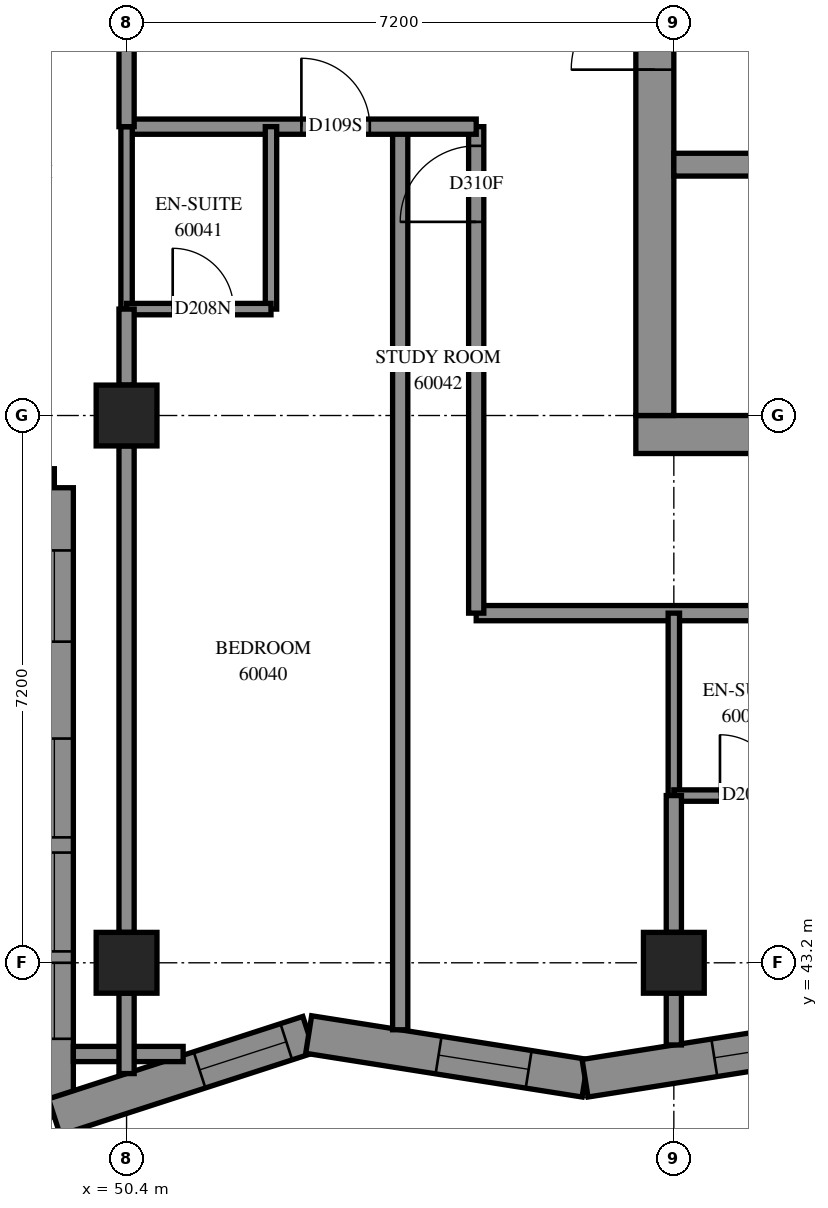
"""IFC4 building model, lengths in metres.
Left out: names, types, materials, properties, quantities, classifications, styles, units other than length and angle.
Written with IfcOpenShell. Run it as: python <this file> out.ifc"""

import sys

from ifc_helpers import new_model, si_unit, direction, frame, frame_2d, origin, origin_2d, place, context, subcontext, project, spatial, polyline, rectangle, outline, extrude, element, fill, save


model = new_model("IFC4")
c1 = context("Model", 3, precision=1e-05, world=origin(), true_north=direction((0.0, 1.0)))
c2 = subcontext(c1, "Body", "Model", "MODEL_VIEW")
j1 = project(units=[si_unit("LENGTHUNIT", "METRE"), si_unit("PLANEANGLEUNIT", "RADIAN")], contexts=[c1])
p1 = place(None, origin())
s1 = spatial("IfcSite", under=j1, at=p1, CompositionType="ELEMENT")
p2 = place(p1, origin())
s2 = spatial("IfcBuilding", under=s1, at=p2, CompositionType="ELEMENT")
p3 = place(p2, frame((0.0, 0.0, 220.2)))
s3 = spatial("IfcBuildingStorey", under=s2, at=p3, CompositionType="ELEMENT", Elevation=220.2)
for number, where, z_axis, x_axis in (
    (1, (50.4, 43.2, 0.0), (0.0, 0.0, 1.0), (1.0, 0.0, 0.0)),
    (2, (50.4, 50.4, 0.0), (0.0, 0.0, 1.0), (1.0, 0.0, 0.0)),
    (3, (57.6, 43.2, 0.0), (0.0, 0.0, 1.0), (1.0, 0.0, 0.0)),
):
    element("IfcColumn", number, at=place(p3, frame(where, z_axis=z_axis, x_axis=x_axis)), inside=s3, PredefinedType="COLUMN", context=c2, shape_type="SweptSolid", body=[
        extrude(rectangle(XDim=0.8, YDim=0.8, at=origin_2d()), origin(), (0.0, 0.0, 1.0), 3.1),
    ])
p4 = place(p3, frame((57.1, 50.15, -0.3), z_axis=(0.0, 0.0, 1.0), x_axis=(1.0, 0.0, 0.0)))
e4 = element("IfcWall", 4, at=p4, inside=s3, PredefinedType="SHEAR", context=c2, shape_type="SweptSolid", body=[
    extrude(rectangle(XDim=15.4, YDim=0.5, at=frame_2d((7.7, 0.0))), origin(), (0.0, 0.0, 1.0), 2.7),
])
p5 = place(p3, frame((57.35, 50.4, -0.3), z_axis=(0.0, 0.0, 1.0), x_axis=(0.0, 1.0, 0.0)))
e5 = element("IfcWall", 5, at=p5, inside=s3, PredefinedType="SHEAR", context=c2, shape_type="SweptSolid", body=[
    extrude(rectangle(XDim=14.4, YDim=0.5, at=frame_2d((7.2, 0.0))), origin(), (0.0, 0.0, 1.0), 2.7),
])
p6 = place(p5, frame((4.55, 0.0, 0.3)))
e6 = element("IfcOpeningElement", 6, at=p6, cuts=e5, PredefinedType="OPENING", context=c2, shape_type="SweptSolid", body=[
    extrude(rectangle(XDim=1.1, YDim=2.1, at=frame_2d((0.55, 1.05))), frame((0.0, 0.26, 0.0), z_axis=(0.0, -1.0, 0.0), x_axis=(1.0, 0.0, 0.0)), (0.0, 0.0, 1.0), 0.52),
])
p7 = place(p5, frame((11.35, 0.0, 0.3)))
e7 = element("IfcOpeningElement", 7, at=p7, cuts=e5, PredefinedType="OPENING", context=c2, shape_type="SweptSolid", body=[
    extrude(rectangle(XDim=1.1, YDim=2.1, at=frame_2d((0.55, 1.05))), frame((0.0, 0.26, 0.0), z_axis=(0.0, -1.0, 0.0), x_axis=(1.0, 0.0, 0.0)), (0.0, 0.0, 1.0), 0.52),
])
p8 = place(p3, frame((57.6, 53.7, 0.0), z_axis=(0.0, 0.0, 1.0), x_axis=(1.0, 0.0, 0.0)))
e8 = element("IfcWall", 8, at=p8, inside=s3, PredefinedType="SOLIDWALL", context=c2, shape_type="SweptSolid", body=[
    extrude(rectangle(XDim=14.4, YDim=0.3, at=frame_2d((7.2, 0.0))), origin(), (0.0, 0.0, 1.0), 3.1),
])
p9 = place(p8, frame((1.35, 0.0, 0.0)))
e9 = element("IfcOpeningElement", 9, at=p9, cuts=e8, PredefinedType="OPENING", context=c2, shape_type="SweptSolid", body=[
    extrude(rectangle(XDim=0.9, YDim=2.1, at=frame_2d((0.45, 1.05))), frame((0.0, 0.16, 0.0), z_axis=(0.0, -1.0, 0.0), x_axis=(1.0, 0.0, 0.0)), (0.0, 0.0, 1.0), 0.32),
])
p10 = place(p8, frame((4.95, 0.0, 0.0)))
e10 = element("IfcOpeningElement", 10, at=p10, cuts=e8, PredefinedType="OPENING", context=c2, shape_type="SweptSolid", body=[
    extrude(rectangle(XDim=0.9, YDim=2.1, at=frame_2d((0.45, 1.05))), frame((0.0, 0.16, 0.0), z_axis=(0.0, -1.0, 0.0), x_axis=(1.0, 0.0, 0.0)), (0.0, 0.0, 1.0), 0.32),
])
p11 = place(p8, frame((8.55, 0.0, 0.0)))
e11 = element("IfcOpeningElement", 11, at=p11, cuts=e8, PredefinedType="OPENING", context=c2, shape_type="SweptSolid", body=[
    extrude(rectangle(XDim=0.9, YDim=2.1, at=frame_2d((0.45, 1.05))), frame((0.0, 0.16, 0.0), z_axis=(0.0, -1.0, 0.0), x_axis=(1.0, 0.0, 0.0)), (0.0, 0.0, 1.0), 0.32),
])
p12 = place(p8, frame((12.05, 0.0, 0.0)))
e12 = element("IfcOpeningElement", 12, at=p12, cuts=e8, PredefinedType="OPENING", context=c2, shape_type="SweptSolid", body=[
    extrude(rectangle(XDim=1.1, YDim=2.1, at=frame_2d((0.55, 1.05))), frame((0.0, 0.16, 0.0), z_axis=(0.0, -1.0, 0.0), x_axis=(1.0, 0.0, 0.0)), (0.0, 0.0, 1.0), 0.32),
])
p13 = place(p3, frame((42.25, 49.45, 0.0), z_axis=(0.0, 0.0, 1.0), x_axis=(1.0, 0.0, 0.0)))
e13 = element("IfcWall", 13, at=p13, inside=s3, PredefinedType="SOLIDWALL", context=c2, shape_type="SweptSolid", body=[
    extrude(outline(polyline([(-0.25, -0.25), (6.95, -0.25), (7.45, 0.25), (0.25, 0.25), (-0.25, -0.25)])), origin(), (0.0, 0.0, 1.0), 3.1),
])
p14 = place(p13, frame((1.35, 0.0, 0.45)))
e14 = element("IfcOpeningElement", 14, at=p14, cuts=e13, PredefinedType="OPENING", context=c2, shape_type="SweptSolid", body=[
    extrude(rectangle(XDim=1.3, YDim=2.5, at=frame_2d((0.65, 1.25))), frame((0.0, 0.26, 0.0), z_axis=(0.0, -1.0, 0.0), x_axis=(1.0, 0.0, 0.0)), (0.0, 0.0, 1.0), 0.52),
])
p15 = place(p13, frame((2.85, 0.0, 0.45)))
e15 = element("IfcOpeningElement", 15, at=p15, cuts=e13, PredefinedType="OPENING", context=c2, shape_type="SweptSolid", body=[
    extrude(rectangle(XDim=1.3, YDim=2.5, at=frame_2d((0.65, 1.25))), frame((0.0, 0.26, 0.0), z_axis=(0.0, -1.0, 0.0), x_axis=(1.0, 0.0, 0.0)), (0.0, 0.0, 1.0), 0.52),
])
p16 = place(p13, frame((5.175, 0.0, 0.45)))
e16 = element("IfcOpeningElement", 16, at=p16, cuts=e13, PredefinedType="OPENING", context=c2, shape_type="SweptSolid", body=[
    extrude(rectangle(XDim=1.2, YDim=2.5, at=frame_2d((0.6, 1.25))), frame((0.0, 0.26, 0.0), z_axis=(0.0, -1.0, 0.0), x_axis=(1.0, 0.0, 0.0)), (0.0, 0.0, 1.0), 0.52),
])
p17 = place(p3, frame((49.45, 49.45, 0.0), z_axis=(0.0, 0.0, 1.0), x_axis=(0.0, -1.0, 0.0)))
e17 = element("IfcWall", 17, at=p17, inside=s3, PredefinedType="SOLIDWALL", context=c2, shape_type="SweptSolid", body=[
    extrude(outline(polyline([(0.25, -0.25), (8.622, -0.25), (7.934, 0.25), (-0.25, 0.25), (0.25, -0.25)])), origin(), (0.0, 0.0, 1.0), 3.1),
])
p18 = place(p17, frame((3.3, 0.0, 0.45)))
e18 = element("IfcOpeningElement", 18, at=p18, cuts=e17, PredefinedType="OPENING", context=c2, shape_type="SweptSolid", body=[
    extrude(rectangle(XDim=1.3, YDim=2.5, at=frame_2d((0.65, 1.25))), frame((0.0, 0.26, 0.0), z_axis=(0.0, -1.0, 0.0), x_axis=(1.0, 0.0, 0.0)), (0.0, 0.0, 1.0), 0.52),
])
p19 = place(p17, frame((4.8, 0.0, 0.45)))
e19 = element("IfcOpeningElement", 19, at=p19, cuts=e17, PredefinedType="OPENING", context=c2, shape_type="SweptSolid", body=[
    extrude(rectangle(XDim=1.3, YDim=2.5, at=frame_2d((0.65, 1.25))), frame((0.0, 0.26, 0.0), z_axis=(0.0, -1.0, 0.0), x_axis=(1.0, 0.0, 0.0)), (0.0, 0.0, 1.0), 0.52),
])
p20 = place(p17, frame((0.825, 0.0, 0.45)))
e20 = element("IfcOpeningElement", 20, at=p20, cuts=e17, PredefinedType="OPENING", context=c2, shape_type="SweptSolid", body=[
    extrude(rectangle(XDim=1.2, YDim=2.5, at=frame_2d((0.6, 1.25))), frame((0.0, 0.26, 0.0), z_axis=(0.0, -1.0, 0.0), x_axis=(1.0, 0.0, 0.0)), (0.0, 0.0, 1.0), 0.52),
])
p21 = place(p17, frame((6.25, 0.0, 0.45)))
e21 = element("IfcOpeningElement", 21, at=p21, cuts=e17, PredefinedType="OPENING", context=c2, shape_type="SweptSolid", body=[
    extrude(rectangle(XDim=1.0, YDim=2.5, at=frame_2d((0.5, 1.25))), frame((0.0, 0.26, 0.0), z_axis=(0.0, -1.0, 0.0), x_axis=(1.0, 0.0, 0.0)), (0.0, 0.0, 1.0), 0.52),
])
p22 = place(p3, frame((49.45, 41.172, 0.0), z_axis=(0.0, 0.0, 1.0), x_axis=(0.9512775992, 0.3083357412, 0.0)))
e22 = element("IfcWall", 22, at=p22, inside=s3, PredefinedType="SOLIDWALL", context=c2, shape_type="SweptSolid", body=[
    extrude(outline(polyline([(-0.344, -0.25), (3.457, -0.25), (3.577, 0.25), (0.344, 0.25), (-0.344, -0.25)])), origin(), (0.0, 0.0, 1.0), 3.1),
])
p23 = place(p22, frame((2.008, 0.0, 0.45)))
e23 = element("IfcOpeningElement", 23, at=p23, cuts=e22, PredefinedType="OPENING", context=c2, shape_type="SweptSolid", body=[
    extrude(rectangle(XDim=1.2, YDim=2.5, at=frame_2d((0.6, 1.25))), frame((0.0, 0.26, 0.0), z_axis=(0.0, -1.0, 0.0), x_axis=(1.0, 0.0, 0.0)), (0.0, 0.0, 1.0), 0.52),
])
p24 = place(p3, frame((52.796, 42.256, 0.0), z_axis=(0.0, 0.0, 1.0), x_axis=(0.9877177726, -0.1562485253, 0.0)))
e24 = element("IfcWall", 24, at=p24, inside=s3, PredefinedType="SOLIDWALL", context=c2, shape_type="SweptSolid", body=[
    extrude(outline(polyline([(0.06, -0.25), (3.721, -0.25), (3.642, 0.25), (-0.06, 0.25), (0.06, -0.25)])), origin(), (0.0, 0.0, 1.0), 3.1),
])
p25 = place(p24, frame((1.73, 0.0, 0.45)))
e25 = element("IfcOpeningElement", 25, at=p25, cuts=e24, PredefinedType="OPENING", context=c2, shape_type="SweptSolid", body=[
    extrude(rectangle(XDim=1.2, YDim=2.5, at=frame_2d((0.6, 1.25))), frame((0.0, 0.26, 0.0), z_axis=(0.0, -1.0, 0.0), x_axis=(1.0, 0.0, 0.0)), (0.0, 0.0, 1.0), 0.52),
])
p26 = place(p3, frame((56.432, 41.681, 0.0), z_axis=(0.0, 0.0, 1.0), x_axis=(0.9877186305, 0.156243102, 0.0)))
e26 = element("IfcWall", 26, at=p26, inside=s3, PredefinedType="SOLIDWALL", context=c2, shape_type="SweptSolid", body=[
    extrude(outline(polyline([(-0.04, -0.25), (3.621, -0.25), (3.7, 0.25), (0.04, 0.25), (-0.04, -0.25)])), origin(), (0.0, 0.0, 1.0), 3.1),
])
p27 = place(p26, frame((1.722, 0.0, 0.45)))
e27 = element("IfcOpeningElement", 27, at=p27, cuts=e26, PredefinedType="OPENING", context=c2, shape_type="SweptSolid", body=[
    extrude(rectangle(XDim=1.2, YDim=2.5, at=frame_2d((0.6, 1.25))), frame((0.0, 0.26, 0.0), z_axis=(0.0, -1.0, 0.0), x_axis=(1.0, 0.0, 0.0)), (0.0, 0.0, 1.0), 0.52),
])
p28 = place(p3, frame((55.0, 47.8, 0.0), z_axis=(0.0, 0.0, 1.0), x_axis=(1.0, 0.0, 0.0)))
e28 = element("IfcWall", 28, at=p28, inside=s3, PredefinedType="PARTITIONING", context=c2, shape_type="SweptSolid", body=[
    extrude(rectangle(XDim=19.266, YDim=0.2, at=frame_2d((9.633, 0.0))), origin(), (0.0, 0.0, 1.0), 3.1),
])
p29 = place(p28, frame((4.9, 0.0, 0.0)))
e29 = element("IfcOpeningElement", 29, at=p29, cuts=e28, PredefinedType="OPENING", context=c2, shape_type="SweptSolid", body=[
    extrude(rectangle(XDim=0.9, YDim=2.1, at=frame_2d((0.45, 1.05))), frame((0.0, 0.11, 0.0), z_axis=(0.0, -1.0, 0.0), x_axis=(1.0, 0.0, 0.0)), (0.0, 0.0, 1.0), 0.22),
])
p30 = place(p28, frame((6.6, 0.0, 0.0)))
e30 = element("IfcOpeningElement", 30, at=p30, cuts=e28, PredefinedType="OPENING", context=c2, shape_type="SweptSolid", body=[
    extrude(rectangle(XDim=0.9, YDim=2.1, at=frame_2d((0.45, 1.05))), frame((0.0, 0.11, 0.0), z_axis=(0.0, -1.0, 0.0), x_axis=(1.0, 0.0, 0.0)), (0.0, 0.0, 1.0), 0.22),
])
p31 = place(p28, frame((13.661, 0.0, 0.0)))
e31 = element("IfcOpeningElement", 31, at=p31, cuts=e28, PredefinedType="OPENING", context=c2, shape_type="SweptSolid", body=[
    extrude(rectangle(XDim=0.9, YDim=2.1, at=frame_2d((0.45, 1.05))), frame((0.0, 0.11, 0.0), z_axis=(0.0, -1.0, 0.0), x_axis=(1.0, 0.0, 0.0)), (0.0, 0.0, 1.0), 0.22),
])
p32 = place(p3, frame((54.0, 42.319, 0.0), z_axis=(0.0, 0.0, 1.0), x_axis=(0.0, 1.0, 0.0)))
e32 = element("IfcWall", 32, at=p32, inside=s3, PredefinedType="PARTITIONING", context=c2, shape_type="SweptSolid", body=[
    extrude(rectangle(XDim=11.881, YDim=0.2, at=frame_2d((5.941, 0.0))), origin(), (0.0, 0.0, 1.0), 3.1),
])
p33 = place(p3, frame((55.0, 47.8, 0.0), z_axis=(0.0, 0.0, 1.0), x_axis=(0.0, 1.0, 0.0)))
e33 = element("IfcWall", 33, at=p33, inside=s3, PredefinedType="PARTITIONING", context=c2, shape_type="SweptSolid", body=[
    extrude(rectangle(XDim=6.4, YDim=0.2, at=frame_2d((3.2, 0.0))), origin(), (0.0, 0.0, 1.0), 3.1),
])
p34 = place(p33, frame((5.147, 0.0, 0.0)))
e34 = element("IfcOpeningElement", 34, at=p34, cuts=e33, PredefinedType="OPENING", context=c2, shape_type="SweptSolid", body=[
    extrude(rectangle(XDim=1.0, YDim=2.1, at=frame_2d((0.5, 1.05))), frame((0.0, 0.11, 0.0), z_axis=(0.0, -1.0, 0.0), x_axis=(1.0, 0.0, 0.0)), (0.0, 0.0, 1.0), 0.22),
])
p35 = place(p3, frame((50.4, 43.6, 0.0), z_axis=(0.0, 0.0, 1.0), x_axis=(0.0, 1.0, 0.0)))
e35 = element("IfcWall", 35, at=p35, inside=s3, PredefinedType="PARTITIONING", context=c2, shape_type="SweptSolid", body=[
    extrude(rectangle(XDim=6.4, YDim=0.2, at=frame_2d((3.2, 0.0))), origin(), (0.0, 0.0, 1.0), 2.6),
])
p36 = place(p3, frame((50.4, 54.2, 0.0), z_axis=(0.0, 0.0, 1.0), x_axis=(1.0, 0.0, 0.0)))
e36 = element("IfcWall", 36, at=p36, inside=s3, PredefinedType="PARTITIONING", context=c2, shape_type="SweptSolid", body=[
    extrude(rectangle(XDim=4.6, YDim=0.2, at=frame_2d((2.3, 0.0))), origin(), (0.0, 0.0, 1.0), 3.1),
])
p37 = place(p36, frame((2.3, 0.0, 0.0)))
e37 = element("IfcOpeningElement", 37, at=p37, cuts=e36, PredefinedType="OPENING", context=c2, shape_type="SweptSolid", body=[
    extrude(rectangle(XDim=0.9, YDim=2.1, at=frame_2d((0.45, 1.05))), frame((0.0, 0.11, 0.0), z_axis=(0.0, -1.0, 0.0), x_axis=(1.0, 0.0, 0.0)), (0.0, 0.0, 1.0), 0.22),
])
for number, where, z_axis, x_axis in (
    (38, (52.3, 51.8, 0.0), (0.0, 0.0, 1.0), (0.0, 1.0, 0.0)),
    (39, (50.4, 51.8, 0.0), (0.0, 0.0, 1.0), (0.0, 1.0, 0.0)),
    (40, (57.6, 45.4, 0.0), (0.0, 0.0, 1.0), (0.0, 1.0, 0.0)),
):
    element("IfcWall", number, at=place(p3, frame(where, z_axis=z_axis, x_axis=x_axis)), inside=s3, PredefinedType="PARTITIONING", context=c2, shape_type="SweptSolid", body=[
        extrude(rectangle(XDim=2.4, YDim=0.15, at=frame_2d((1.2, 0.0))), origin(), (0.0, 0.0, 1.0), 3.1),
    ])
p38 = place(p3, frame((50.4, 54.2, 0.0), z_axis=(0.0, 0.0, 1.0), x_axis=(0.0, 1.0, 0.0)))
e41 = element("IfcWall", 41, at=p38, inside=s3, PredefinedType="PARTITIONING", context=c2, shape_type="SweptSolid", body=[
    extrude(rectangle(XDim=2.0, YDim=0.2, at=frame_2d((1.0, 0.0))), origin(), (0.0, 0.0, 1.0), 3.1),
])
p39 = place(p3, frame((50.4, 51.8, 0.0), z_axis=(0.0, 0.0, 1.0), x_axis=(1.0, 0.0, 0.0)))
e42 = element("IfcWall", 42, at=p39, inside=s3, PredefinedType="PARTITIONING", context=c2, shape_type="SweptSolid", body=[
    extrude(rectangle(XDim=1.9, YDim=0.15, at=frame_2d((0.95, 0.0))), origin(), (0.0, 0.0, 1.0), 3.1),
])
p40 = place(p39, frame((0.607, 0.0, 0.0)))
e43 = element("IfcOpeningElement", 43, at=p40, cuts=e42, PredefinedType="OPENING", context=c2, shape_type="SweptSolid", body=[
    extrude(rectangle(XDim=0.8, YDim=2.1, at=frame_2d((0.4, 1.05))), frame((0.0, 0.085, 0.0), z_axis=(0.0, -1.0, 0.0), x_axis=(1.0, 0.0, 0.0)), (0.0, 0.0, 1.0), 0.17),
])
p41 = place(p3, frame((57.6, 45.4, 0.0), z_axis=(0.0, 0.0, 1.0), x_axis=(1.0, 0.0, 0.0)))
e44 = element("IfcWall", 44, at=p41, inside=s3, PredefinedType="PARTITIONING", context=c2, shape_type="SweptSolid", body=[
    extrude(rectangle(XDim=1.9, YDim=0.15, at=frame_2d((0.95, 0.0))), origin(), (0.0, 0.0, 1.0), 3.1),
])
p42 = place(p41, frame((0.607, 0.0, 0.0)))
e45 = element("IfcOpeningElement", 45, at=p42, cuts=e44, PredefinedType="OPENING", context=c2, shape_type="SweptSolid", body=[
    extrude(rectangle(XDim=0.8, YDim=2.1, at=frame_2d((0.4, 1.05))), frame((0.0, 0.085, 0.0), z_axis=(0.0, -1.0, 0.0), x_axis=(1.0, 0.0, 0.0)), (0.0, 0.0, 1.0), 0.17),
])
p43 = place(p3, frame((57.6, 43.6, 0.0), z_axis=(0.0, 0.0, 1.0), x_axis=(0.0, 1.0, 0.0)))
e46 = element("IfcWall", 46, at=p43, inside=s3, PredefinedType="PARTITIONING", context=c2, shape_type="SweptSolid", body=[
    extrude(rectangle(XDim=1.8, YDim=0.2, at=frame_2d((0.9, 0.0))), origin(), (0.0, 0.0, 1.0), 3.1),
])
p44 = place(p3, frame((49.7, 42.0, 0.0), z_axis=(0.0, 0.0, 1.0), x_axis=(1.0, 0.0, 0.0)))
e47 = element("IfcWall", 47, at=p44, inside=s3, PredefinedType="PARTITIONING", context=c2, shape_type="SweptSolid", body=[
    extrude(rectangle(XDim=1.444, YDim=0.2, at=frame_2d((0.722, 0.0))), origin(), (0.0, 0.0, 1.0), 3.1),
])
p45 = place(p3, frame((50.4, 50.8, 0.0), z_axis=(0.0, 0.0, 1.0), x_axis=(0.0, 1.0, 0.0)))
e48 = element("IfcWall", 48, at=p45, inside=s3, PredefinedType="PARTITIONING", context=c2, shape_type="SweptSolid", body=[
    extrude(rectangle(XDim=1.0, YDim=0.2, at=frame_2d((0.5, 0.0))), origin(), (0.0, 0.0, 1.0), 3.1),
])
p46 = place(p3, frame((50.4, 41.742, 0.0), z_axis=(0.0, 0.0, 1.0), x_axis=(0.0, 1.0, 0.0)))
e49 = element("IfcWall", 49, at=p46, inside=s3, PredefinedType="PARTITIONING", context=c2, shape_type="SweptSolid", body=[
    extrude(rectangle(XDim=1.058, YDim=0.2, at=frame_2d((0.529, 0.0))), origin(), (0.0, 0.0, 1.0), 3.1),
])
p47 = place(p3, frame((57.6, 42.119, 0.0), z_axis=(0.0, 0.0, 1.0), x_axis=(0.0, 1.0, 0.0)))
e50 = element("IfcWall", 50, at=p47, inside=s3, PredefinedType="PARTITIONING", context=c2, shape_type="SweptSolid", body=[
    extrude(rectangle(XDim=0.681, YDim=0.2, at=frame_2d((0.341, 0.0))), origin(), (0.0, 0.0, 1.0), 3.1),
])
p48 = place(p18, origin())
e51 = element("IfcWindow", 51, at=p48, inside=s3, PartitioningType="SINGLE_PANEL", PredefinedType="WINDOW", context=c2, shape_type="SweptSolid", body=[
    extrude(rectangle(XDim=1.3, YDim=2.5, at=frame_2d((0.65, 1.25))), frame((0.0, 0.18, 0.0), z_axis=(0.0, -1.0, 0.0), x_axis=(1.0, 0.0, 0.0)), (0.0, 0.0, 1.0), 0.06),
])
fill(e18, e51)
p49 = place(p19, origin())
e52 = element("IfcWindow", 52, at=p49, inside=s3, PartitioningType="SINGLE_PANEL", PredefinedType="WINDOW", context=c2, shape_type="SweptSolid", body=[
    extrude(rectangle(XDim=1.3, YDim=2.5, at=frame_2d((0.65, 1.25))), frame((0.0, 0.18, 0.0), z_axis=(0.0, -1.0, 0.0), x_axis=(1.0, 0.0, 0.0)), (0.0, 0.0, 1.0), 0.06),
])
fill(e19, e52)
p50 = place(p20, origin())
e53 = element("IfcWindow", 53, at=p50, inside=s3, PartitioningType="SINGLE_PANEL", PredefinedType="WINDOW", context=c2, shape_type="SweptSolid", body=[
    extrude(rectangle(XDim=1.2, YDim=2.5, at=frame_2d((0.6, 1.25))), frame((0.0, 0.18, 0.0), z_axis=(0.0, -1.0, 0.0), x_axis=(1.0, 0.0, 0.0)), (0.0, 0.0, 1.0), 0.06),
])
fill(e20, e53)
p51 = place(p23, origin())
e54 = element("IfcWindow", 54, at=p51, inside=s3, PartitioningType="SINGLE_PANEL", PredefinedType="WINDOW", context=c2, shape_type="SweptSolid", body=[
    extrude(rectangle(XDim=1.2, YDim=2.5, at=frame_2d((0.6, 1.25))), frame((0.0, 0.18, 0.0), z_axis=(0.0, -1.0, 0.0), x_axis=(1.0, 0.0, 0.0)), (0.0, 0.0, 1.0), 0.06),
])
fill(e23, e54)
p52 = place(p25, origin())
e55 = element("IfcWindow", 55, at=p52, inside=s3, PartitioningType="SINGLE_PANEL", PredefinedType="WINDOW", context=c2, shape_type="SweptSolid", body=[
    extrude(rectangle(XDim=1.2, YDim=2.5, at=frame_2d((0.6, 1.25))), frame((0.0, 0.18, 0.0), z_axis=(0.0, -1.0, 0.0), x_axis=(1.0, 0.0, 0.0)), (0.0, 0.0, 1.0), 0.06),
])
fill(e25, e55)
p53 = place(p27, origin())
e56 = element("IfcWindow", 56, at=p53, inside=s3, PartitioningType="SINGLE_PANEL", PredefinedType="WINDOW", context=c2, shape_type="SweptSolid", body=[
    extrude(rectangle(XDim=1.2, YDim=2.5, at=frame_2d((0.6, 1.25))), frame((0.0, 0.18, 0.0), z_axis=(0.0, -1.0, 0.0), x_axis=(1.0, 0.0, 0.0)), (0.0, 0.0, 1.0), 0.06),
])
fill(e27, e56)
p54 = place(p6, origin())
e57 = element("IfcDoor", 57, at=p54, inside=s3, OperationType="DOUBLE_DOOR_SINGLE_SWING", PredefinedType="DOOR", context=c2, shape_type="SweptSolid", body=[
    extrude(rectangle(XDim=1.1, YDim=2.1, at=frame_2d((0.55, 1.05))), frame((0.0, 0.025, 0.0), z_axis=(0.0, -1.0, 0.0), x_axis=(1.0, 0.0, 0.0)), (0.0, 0.0, 1.0), 0.05),
])
fill(e6, e57)
p55 = place(p37, origin())
e58 = element("IfcDoor", 58, at=p55, inside=s3, OperationType="SINGLE_SWING_LEFT", PredefinedType="DOOR", context=c2, shape_type="SweptSolid", body=[
    extrude(rectangle(XDim=0.9, YDim=2.1, at=frame_2d((0.45, 1.05))), frame((0.0, 0.025, 0.0), z_axis=(0.0, -1.0, 0.0), x_axis=(1.0, 0.0, 0.0)), (0.0, 0.0, 1.0), 0.05),
])
fill(e37, e58)
p56 = place(p40, origin())
e59 = element("IfcDoor", 59, at=p56, inside=s3, OperationType="SINGLE_SWING_RIGHT", PredefinedType="DOOR", context=c2, shape_type="SweptSolid", body=[
    extrude(rectangle(XDim=0.8, YDim=2.1, at=frame_2d((0.4, 1.05))), frame((0.0, 0.025, 0.0), z_axis=(0.0, -1.0, 0.0), x_axis=(1.0, 0.0, 0.0)), (0.0, 0.0, 1.0), 0.05),
])
fill(e43, e59)
p57 = place(p34, origin())
e60 = element("IfcDoor", 60, at=p57, inside=s3, OperationType="SINGLE_SWING_RIGHT", PredefinedType="DOOR", context=c2, shape_type="SweptSolid", body=[
    extrude(rectangle(XDim=1.0, YDim=2.1, at=frame_2d((0.5, 1.05))), frame((0.0, 0.025, 0.0), z_axis=(0.0, -1.0, 0.0), x_axis=(1.0, 0.0, 0.0)), (0.0, 0.0, 1.0), 0.05),
])
fill(e34, e60)
p58 = place(p42, origin())
e61 = element("IfcDoor", 61, at=p58, inside=s3, OperationType="SINGLE_SWING_RIGHT", PredefinedType="DOOR", context=c2, shape_type="SweptSolid", body=[
    extrude(rectangle(XDim=0.8, YDim=2.1, at=frame_2d((0.4, 1.05))), frame((0.0, 0.025, 0.0), z_axis=(0.0, -1.0, 0.0), x_axis=(1.0, 0.0, 0.0)), (0.0, 0.0, 1.0), 0.05),
])
fill(e45, e61)
p59 = place(p21, origin())
e62 = element("IfcWindow", 62, at=p59, inside=s3, PartitioningType="SINGLE_PANEL", PredefinedType="WINDOW", context=c2, shape_type="SweptSolid", body=[
    extrude(rectangle(XDim=1.0, YDim=2.5, at=frame_2d((0.5, 1.25))), frame((0.0, 0.18, 0.0), z_axis=(0.0, -1.0, 0.0), x_axis=(1.0, 0.0, 0.0)), (0.0, 0.0, 1.0), 0.06),
])
fill(e21, e62)
save(model, sys.argv[1])
